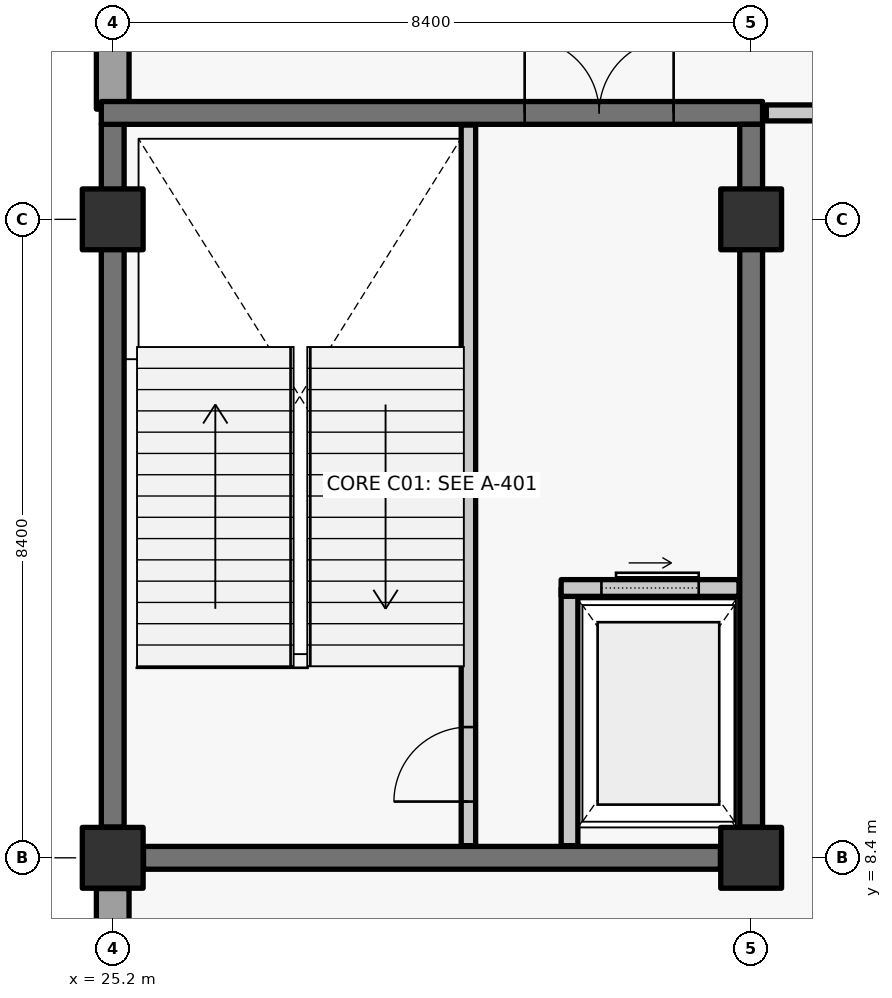
"""IFC4 building model, lengths in metres.
Left out: names, types, materials, properties, quantities, classifications, styles, units other than length and angle.
Written with IfcOpenShell. Run it as: python <this file> out.ifc"""

import sys

from ifc_helpers import new_model, si_unit, direction, frame, frame_2d, origin, origin_2d, place, context, subcontext, project, spatial, rectangle, extrude, element, fill, save


model = new_model("IFC4")
c1 = context("Model", 3, precision=1e-05, world=origin(), true_north=direction((0.0, 1.0)))
c2 = subcontext(c1, "Body", "Model", "MODEL_VIEW")
j1 = project(units=[si_unit("LENGTHUNIT", "METRE"), si_unit("PLANEANGLEUNIT", "RADIAN")], contexts=[c1])
p1 = place(None, origin())
s1 = spatial("IfcSite", under=j1, at=p1, CompositionType="ELEMENT")
p2 = place(p1, origin())
s2 = spatial("IfcBuilding", under=s1, at=p2, CompositionType="ELEMENT")
p3 = place(p2, frame((0.0, 0.0, 6.0)))
s3 = spatial("IfcBuildingStorey", under=s2, at=p3, CompositionType="ELEMENT", Elevation=6.0)
for number, where, z_axis, x_axis in (
    (1, (25.2, 8.4, 0.0), (0.0, 0.0, 1.0), (1.0, 0.0, 0.0)),
    (2, (25.2, 16.8, 0.0), (0.0, 0.0, 1.0), (1.0, 0.0, 0.0)),
    (3, (33.6, 8.4, 0.0), (0.0, 0.0, 1.0), (1.0, 0.0, 0.0)),
    (4, (33.6, 16.8, 0.0), (0.0, 0.0, 1.0), (1.0, 0.0, 0.0)),
):
    element("IfcColumn", number, at=place(p3, frame(where, z_axis=z_axis, x_axis=x_axis)), inside=s3, PredefinedType="COLUMN", context=c2, shape_type="SweptSolid", body=[
        extrude(rectangle(XDim=0.8, YDim=0.8, at=origin_2d()), origin(), (0.0, 0.0, 1.0), 5.4),
    ])
p4 = place(p3, frame((25.2, 0.405, 0.0), z_axis=(0.0, 0.0, 1.0), x_axis=(0.0, 1.0, 0.0)))
e5 = element("IfcWall", 5, at=p4, inside=s3, PredefinedType="SOLIDWALL", context=c2, shape_type="SweptSolid", body=[
    extrude(rectangle(XDim=7.59, YDim=0.43, at=frame_2d((3.795, 0.0))), origin(), (0.0, 0.0, 1.0), 5.12),
])
p5 = place(p4, frame((3.12, 0.0, 0.95)))
e6 = element("IfcOpeningElement", 6, at=p5, cuts=e5, PredefinedType="OPENING", context=c2, shape_type="SweptSolid", body=[
    extrude(rectangle(XDim=1.35, YDim=1.95, at=frame_2d((0.675, 0.975))), frame((0.0, 0.225, 0.0), z_axis=(0.0, -1.0, 0.0), x_axis=(1.0, 0.0, 0.0)), (0.0, 0.0, 1.0), 0.45),
])
p6 = place(p3, frame((25.2, 18.25, 0.0), z_axis=(0.0, 0.0, 1.0), x_axis=(0.0, 1.0, 0.0)))
e7 = element("IfcWall", 7, at=p6, inside=s3, PredefinedType="SOLIDWALL", context=c2, shape_type="SweptSolid", body=[
    extrude(rectangle(XDim=6.545, YDim=0.43, at=frame_2d((3.272, 0.0))), origin(), (0.0, 0.0, 1.0), 5.12),
])
p7 = place(p6, frame((2.575, 0.0, 0.95)))
e8 = element("IfcOpeningElement", 8, at=p7, cuts=e7, PredefinedType="OPENING", context=c2, shape_type="SweptSolid", body=[
    extrude(rectangle(XDim=1.35, YDim=1.95, at=frame_2d((0.675, 0.975))), frame((0.0, 0.225, 0.0), z_axis=(0.0, -1.0, 0.0), x_axis=(1.0, 0.0, 0.0)), (0.0, 0.0, 1.0), 0.45),
])
p8 = place(p3, frame((33.195, 8.4, 0.0), z_axis=(0.0, 0.0, 1.0), x_axis=(-1.0, 0.0, 0.0)))
e9 = element("IfcWall", 9, at=p8, inside=s3, PredefinedType="SHEAR", context=c2, shape_type="SweptSolid", body=[
    extrude(rectangle(XDim=7.59, YDim=0.3, at=frame_2d((3.795, 0.0))), origin(), (0.0, 0.0, 1.0), 5.12),
])
p9 = place(p3, frame((25.2, 8.805, 0.0), z_axis=(0.0, 0.0, 1.0), x_axis=(0.0, 1.0, 0.0)))
e10 = element("IfcWall", 10, at=p9, inside=s3, PredefinedType="SHEAR", context=c2, shape_type="SweptSolid", body=[
    extrude(rectangle(XDim=9.245, YDim=0.3, at=frame_2d((4.623, 0.0))), origin(), (0.0, 0.0, 1.0), 5.12),
])
p10 = place(p3, frame((25.05, 18.2, 0.0), z_axis=(0.0, 0.0, 1.0), x_axis=(1.0, 0.0, 0.0)))
e11 = element("IfcWall", 11, at=p10, inside=s3, PredefinedType="SHEAR", context=c2, shape_type="SweptSolid", body=[
    extrude(rectangle(XDim=8.7, YDim=0.3, at=frame_2d((4.35, 0.0))), origin(), (0.0, 0.0, 1.0), 5.12),
])
p11 = place(p10, frame((5.57, 0.0, 0.0)))
e12 = element("IfcOpeningElement", 12, at=p11, cuts=e11, PredefinedType="OPENING", context=c2, shape_type="SweptSolid", body=[
    extrude(rectangle(XDim=1.96, YDim=2.2, at=frame_2d((0.98, 1.1))), frame((0.0, 0.16, 0.0), z_axis=(0.0, -1.0, 0.0), x_axis=(1.0, 0.0, 0.0)), (0.0, 0.0, 1.0), 0.32),
])
p12 = place(p3, frame((33.6, 18.05, 0.0), z_axis=(0.0, 0.0, 1.0), x_axis=(0.0, -1.0, 0.0)))
e13 = element("IfcWall", 13, at=p12, inside=s3, PredefinedType="SHEAR", context=c2, shape_type="SweptSolid", body=[
    extrude(rectangle(XDim=9.245, YDim=0.3, at=frame_2d((4.623, 0.0))), origin(), (0.0, 0.0, 1.0), 5.12),
])
p13 = place(p3, frame((29.88, 8.56, 0.0), z_axis=(0.0, 0.0, 1.0), x_axis=(0.0, 1.0, 0.0)))
e14 = element("IfcWall", 14, at=p13, inside=s3, PredefinedType="SOLIDWALL", context=c2, shape_type="SweptSolid", body=[
    extrude(rectangle(XDim=9.48, YDim=0.19, at=frame_2d((4.74, 0.0))), origin(), (0.0, 0.0, 1.0), 5.12),
])
p14 = place(p13, frame((0.58, 0.0, 0.0)))
e15 = element("IfcOpeningElement", 15, at=p14, cuts=e14, PredefinedType="OPENING", context=c2, shape_type="SweptSolid", body=[
    extrude(rectangle(XDim=0.98, YDim=2.15, at=frame_2d((0.49, 1.075))), frame((0.0, 0.105, 0.0), z_axis=(0.0, -1.0, 0.0), x_axis=(1.0, 0.0, 0.0)), (0.0, 0.0, 1.0), 0.21),
])
p15 = place(p3, frame((31.21, 8.56, 0.0), z_axis=(0.0, 0.0, 1.0), x_axis=(0.0, 1.0, 0.0)))
e16 = element("IfcWall", 16, at=p15, inside=s3, PredefinedType="SOLIDWALL", context=c2, shape_type="SweptSolid", body=[
    extrude(rectangle(XDim=3.39, YDim=0.22, at=frame_2d((1.695, 0.0))), origin(), (0.0, 0.0, 1.0), 5.12),
])
p16 = place(p3, frame((31.1, 11.95, 0.0), z_axis=(0.0, 0.0, 1.0), x_axis=(1.0, 0.0, 0.0)))
e17 = element("IfcWall", 17, at=p16, inside=s3, PredefinedType="SOLIDWALL", context=c2, shape_type="SweptSolid", body=[
    extrude(rectangle(XDim=2.34, YDim=0.22, at=frame_2d((1.17, 0.0))), origin(), (0.0, 0.0, 1.0), 5.12),
])
p17 = place(p16, frame((0.53, 0.0, 0.0)))
e18 = element("IfcOpeningElement", 18, at=p17, cuts=e17, PredefinedType="OPENING", context=c2, shape_type="SweptSolid", body=[
    extrude(rectangle(XDim=1.28, YDim=2.25, at=frame_2d((0.64, 1.125))), frame((0.0, 0.12, 0.0), z_axis=(0.0, -1.0, 0.0), x_axis=(1.0, 0.0, 0.0)), (0.0, 0.0, 1.0), 0.24),
])
p18 = place(p3, frame((33.8, 18.2, 0.0), z_axis=(0.0, 0.0, 1.0), x_axis=(1.0, 0.0, 0.0)))
e19 = element("IfcWall", 19, at=p18, inside=s3, PredefinedType="PARTITIONING", context=c2, shape_type="SweptSolid", body=[
    extrude(rectangle(XDim=33.2, YDim=0.21, at=frame_2d((16.6, 0.0))), origin(), (0.0, 0.0, 1.0), 5.12),
])
p19 = place(p18, frame((3.5, 0.0, 0.0)))
e20 = element("IfcOpeningElement", 20, at=p19, cuts=e19, PredefinedType="OPENING", context=c2, shape_type="SweptSolid", body=[
    extrude(rectangle(XDim=1.0, YDim=2.15, at=frame_2d((0.5, 1.075))), frame((0.0, 0.115, 0.0), z_axis=(0.0, -1.0, 0.0), x_axis=(1.0, 0.0, 0.0)), (0.0, 0.0, 1.0), 0.23),
])
p20 = place(p18, frame((20.3, 0.0, 0.0)))
e21 = element("IfcOpeningElement", 21, at=p20, cuts=e19, PredefinedType="OPENING", context=c2, shape_type="SweptSolid", body=[
    extrude(rectangle(XDim=1.0, YDim=2.15, at=frame_2d((0.5, 1.075))), frame((0.0, 0.115, 0.0), z_axis=(0.0, -1.0, 0.0), x_axis=(1.0, 0.0, 0.0)), (0.0, 0.0, 1.0), 0.23),
])
p21 = place(p14, origin())
e22 = element("IfcDoor", 22, at=p21, inside=s3, OperationType="SINGLE_SWING_LEFT", PredefinedType="DOOR", context=c2, shape_type="SweptSolid", body=[
    extrude(rectangle(XDim=0.98, YDim=2.15, at=frame_2d((0.49, 1.075))), frame((0.0, 0.025, 0.0), z_axis=(0.0, -1.0, 0.0), x_axis=(1.0, 0.0, 0.0)), (0.0, 0.0, 1.0), 0.05),
])
fill(e15, e22)
p22 = place(p11, origin())
e23 = element("IfcDoor", 23, at=p22, inside=s3, OperationType="DOUBLE_DOOR_SINGLE_SWING", PredefinedType="DOOR", context=c2, shape_type="SweptSolid", body=[
    extrude(rectangle(XDim=1.96, YDim=2.2, at=frame_2d((0.98, 1.1))), frame((0.0, 0.025, 0.0), z_axis=(0.0, -1.0, 0.0), x_axis=(1.0, 0.0, 0.0)), (0.0, 0.0, 1.0), 0.05),
])
fill(e12, e23)
p23 = place(p17, origin())
e24 = element("IfcDoor", 24, at=p23, inside=s3, OperationType="SLIDING_TO_RIGHT", PredefinedType="DOOR", context=c2, shape_type="SweptSolid", body=[
    extrude(rectangle(XDim=1.28, YDim=2.25, at=frame_2d((0.64, 1.125))), frame((0.0, 0.025, 0.0), z_axis=(0.0, -1.0, 0.0), x_axis=(1.0, 0.0, 0.0)), (0.0, 0.0, 1.0), 0.05),
])
fill(e18, e24)
save(model, sys.argv[1])
